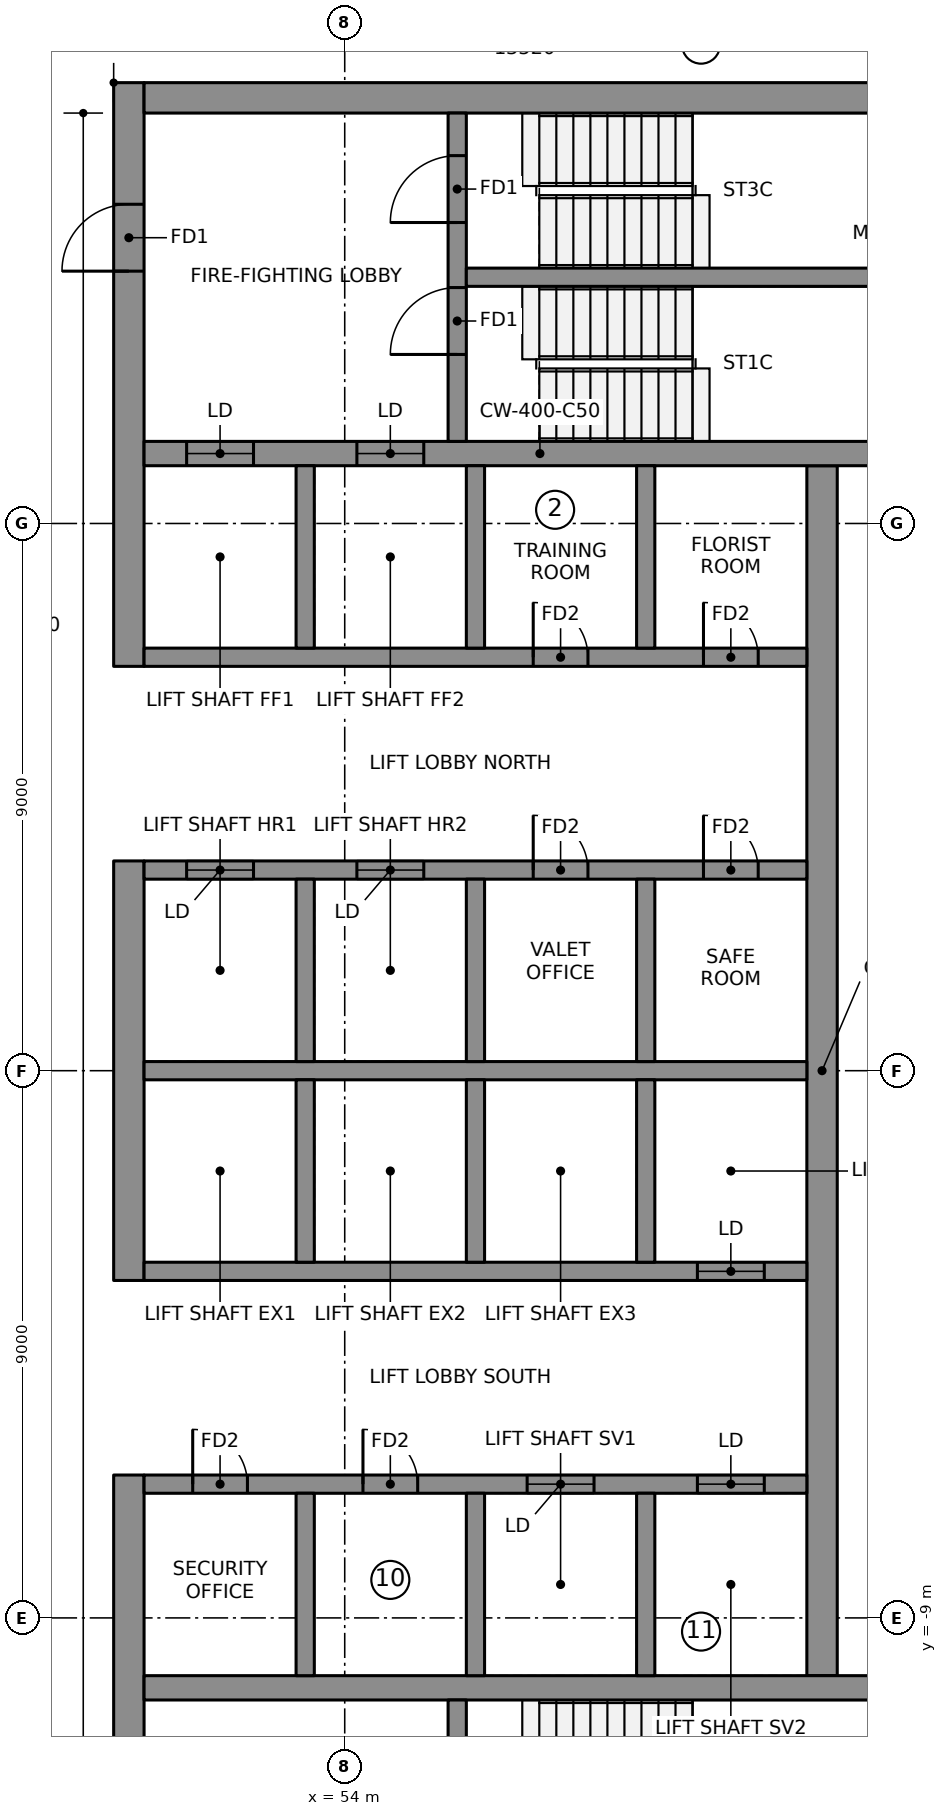
"""IFC4 building model, lengths in metres.
Left out: names, types, materials, properties, quantities, classifications, styles, units other than length and angle.
Written with IfcOpenShell. Run it as: python <this file> out.ifc"""

import sys

from ifc_helpers import new_model, si_unit, direction, frame, frame_2d, origin, place, context, subcontext, project, spatial, rectangle, extrude, element, fill, save


model = new_model("IFC4")
c1 = context("Model", 3, precision=1e-05, world=origin(), true_north=direction((0.0, 1.0)))
c2 = subcontext(c1, "Body", "Model", "MODEL_VIEW")
j1 = project(units=[si_unit("LENGTHUNIT", "METRE"), si_unit("PLANEANGLEUNIT", "RADIAN")], contexts=[c1])
p1 = place(None, origin())
s1 = spatial("IfcSite", under=j1, at=p1, CompositionType="ELEMENT")
p2 = place(p1, origin())
s2 = spatial("IfcBuilding", under=s1, at=p2, CompositionType="ELEMENT")
p3 = place(p2, frame((0.0, 0.0, 282.1)))
s3 = spatial("IfcBuildingStorey", under=s2, at=p3, CompositionType="ELEMENT", Elevation=282.1)
p4 = place(p3, frame((50.45, 6.65, 0.0), z_axis=(0.0, 0.0, 1.0), x_axis=(0.0, 1.0, 0.0)))
e1 = element("IfcWall", 1, at=p4, inside=s3, PredefinedType="SHEAR", context=c2, shape_type="SweptSolid", body=[
    extrude(rectangle(XDim=9.6, YDim=0.5, at=frame_2d((4.8, 0.0))), origin(), (0.0, 0.0, 1.0), 3.55),
])
p5 = place(p4, frame((6.5, 0.0, 0.0)))
e2 = element("IfcOpeningElement", 2, at=p5, cuts=e1, PredefinedType="OPENING", context=c2, shape_type="SweptSolid", body=[
    extrude(rectangle(XDim=1.1, YDim=2.1, at=frame_2d((0.55, 1.05))), frame((0.0, 0.26, 0.0), z_axis=(0.0, -1.0, 0.0), x_axis=(1.0, 0.0, 0.0)), (0.0, 0.0, 1.0), 0.52),
])
p6 = place(p3, frame((50.45, -3.45, 0.0), z_axis=(0.0, 0.0, 1.0), x_axis=(0.0, 1.0, 0.0)))
e3 = element("IfcWall", 3, at=p6, inside=s3, PredefinedType="SHEAR", context=c2, shape_type="SweptSolid", body=[
    extrude(rectangle(XDim=6.9, YDim=0.5, at=frame_2d((3.45, 0.0))), origin(), (0.0, 0.0, 1.0), 3.55),
])
p7 = place(p3, frame((50.45, -16.25, 0.0), z_axis=(0.0, 0.0, 1.0), x_axis=(0.0, 1.0, 0.0)))
e4 = element("IfcWall", 4, at=p7, inside=s3, PredefinedType="SHEAR", context=c2, shape_type="SweptSolid", body=[
    extrude(rectangle(XDim=9.6, YDim=0.5, at=frame_2d((4.8, 0.0))), origin(), (0.0, 0.0, 1.0), 3.55),
])
p8 = place(p7, frame((2.0, 0.0, 0.0)))
e5 = element("IfcOpeningElement", 5, at=p8, cuts=e4, PredefinedType="OPENING", context=c2, shape_type="SweptSolid", body=[
    extrude(rectangle(XDim=1.1, YDim=2.1, at=frame_2d((0.55, 1.05))), frame((0.0, 0.26, 0.0), z_axis=(0.0, -1.0, 0.0), x_axis=(1.0, 0.0, 0.0)), (0.0, 0.0, 1.0), 0.52),
])
p9 = place(p3, frame((50.7, 16.0, 0.0), z_axis=(0.0, 0.0, 1.0), x_axis=(1.0, 0.0, 0.0)))
e6 = element("IfcWall", 6, at=p9, inside=s3, PredefinedType="SHEAR", context=c2, shape_type="SweptSolid", body=[
    extrude(rectangle(XDim=13.52, YDim=0.5, at=frame_2d((6.76, 0.0))), origin(), (0.0, 0.0, 1.0), 3.55),
])
p10 = place(p3, frame((61.85, -9.95, 0.0), z_axis=(0.0, 0.0, 1.0), x_axis=(0.0, 1.0, 0.0)))
e7 = element("IfcWall", 7, at=p10, inside=s3, PredefinedType="SHEAR", context=c2, shape_type="SweptSolid", body=[
    extrude(rectangle(XDim=19.9, YDim=0.5, at=frame_2d((9.95, 0.0))), origin(), (0.0, 0.0, 1.0), 3.55),
])
p11 = place(p3, frame((50.7, 10.15, 0.0), z_axis=(0.0, 0.0, 1.0), x_axis=(1.0, 0.0, 0.0)))
e8 = element("IfcWall", 8, at=p11, inside=s3, PredefinedType="SHEAR", context=c2, shape_type="SweptSolid", body=[
    extrude(rectangle(XDim=13.02, YDim=0.4, at=frame_2d((6.51, 0.0))), origin(), (0.0, 0.0, 1.0), 3.55),
])
p12 = place(p11, frame((0.7, 0.0, 0.0)))
e9 = element("IfcOpeningElement", 9, at=p12, cuts=e8, PredefinedType="OPENING", context=c2, shape_type="SweptSolid", body=[
    extrude(rectangle(XDim=1.1, YDim=2.1, at=frame_2d((0.55, 1.05))), frame((0.0, 0.21, 0.0), z_axis=(0.0, -1.0, 0.0), x_axis=(1.0, 0.0, 0.0)), (0.0, 0.0, 1.0), 0.42),
])
p13 = place(p11, frame((3.5, 0.0, 0.0)))
e10 = element("IfcOpeningElement", 10, at=p13, cuts=e8, PredefinedType="OPENING", context=c2, shape_type="SweptSolid", body=[
    extrude(rectangle(XDim=1.1, YDim=2.1, at=frame_2d((0.55, 1.05))), frame((0.0, 0.21, 0.0), z_axis=(0.0, -1.0, 0.0), x_axis=(1.0, 0.0, 0.0)), (0.0, 0.0, 1.0), 0.42),
])
p14 = place(p3, frame((50.7, -10.15, 0.0), z_axis=(0.0, 0.0, 1.0), x_axis=(1.0, 0.0, 0.0)))
e11 = element("IfcWall", 11, at=p14, inside=s3, PredefinedType="SHEAR", context=c2, shape_type="SweptSolid", body=[
    extrude(rectangle(XDim=13.02, YDim=0.4, at=frame_2d((6.51, 0.0))), origin(), (0.0, 0.0, 1.0), 3.55),
])
p15 = place(p3, frame((50.7, 0.0, 0.0), z_axis=(0.0, 0.0, 1.0), x_axis=(1.0, 0.0, 0.0)))
e12 = element("IfcWall", 12, at=p15, inside=s3, PredefinedType="SHEAR", context=c2, shape_type="SweptSolid", body=[
    extrude(rectangle(XDim=10.9, YDim=0.3, at=frame_2d((5.45, 0.0))), origin(), (0.0, 0.0, 1.0), 3.55),
])
p16 = place(p3, frame((50.7, 3.3, 0.0), z_axis=(0.0, 0.0, 1.0), x_axis=(1.0, 0.0, 0.0)))
e13 = element("IfcWall", 13, at=p16, inside=s3, PredefinedType="SHEAR", context=c2, shape_type="SweptSolid", body=[
    extrude(rectangle(XDim=10.9, YDim=0.3, at=frame_2d((5.45, 0.0))), origin(), (0.0, 0.0, 1.0), 3.55),
])
p17 = place(p16, frame((0.7, 0.0, 0.0)))
e14 = element("IfcOpeningElement", 14, at=p17, cuts=e13, PredefinedType="OPENING", context=c2, shape_type="SweptSolid", body=[
    extrude(rectangle(XDim=1.1, YDim=2.1, at=frame_2d((0.55, 1.05))), frame((0.0, 0.16, 0.0), z_axis=(0.0, -1.0, 0.0), x_axis=(1.0, 0.0, 0.0)), (0.0, 0.0, 1.0), 0.32),
])
p18 = place(p16, frame((3.5, 0.0, 0.0)))
e15 = element("IfcOpeningElement", 15, at=p18, cuts=e13, PredefinedType="OPENING", context=c2, shape_type="SweptSolid", body=[
    extrude(rectangle(XDim=1.1, YDim=2.1, at=frame_2d((0.55, 1.05))), frame((0.0, 0.16, 0.0), z_axis=(0.0, -1.0, 0.0), x_axis=(1.0, 0.0, 0.0)), (0.0, 0.0, 1.0), 0.32),
])
p19 = place(p16, frame((6.4, 0.0, 0.0)))
e16 = element("IfcOpeningElement", 16, at=p19, cuts=e13, PredefinedType="OPENING", context=c2, shape_type="SweptSolid", body=[
    extrude(rectangle(XDim=0.9, YDim=2.1, at=frame_2d((0.45, 1.05))), frame((0.0, 0.16, 0.0), z_axis=(0.0, -1.0, 0.0), x_axis=(1.0, 0.0, 0.0)), (0.0, 0.0, 1.0), 0.32),
])
p20 = place(p16, frame((9.2, 0.0, 0.0)))
e17 = element("IfcOpeningElement", 17, at=p20, cuts=e13, PredefinedType="OPENING", context=c2, shape_type="SweptSolid", body=[
    extrude(rectangle(XDim=0.9, YDim=2.1, at=frame_2d((0.45, 1.05))), frame((0.0, 0.16, 0.0), z_axis=(0.0, -1.0, 0.0), x_axis=(1.0, 0.0, 0.0)), (0.0, 0.0, 1.0), 0.32),
])
p21 = place(p3, frame((50.7, 6.8, 0.0), z_axis=(0.0, 0.0, 1.0), x_axis=(1.0, 0.0, 0.0)))
e18 = element("IfcWall", 18, at=p21, inside=s3, PredefinedType="SHEAR", context=c2, shape_type="SweptSolid", body=[
    extrude(rectangle(XDim=10.9, YDim=0.3, at=frame_2d((5.45, 0.0))), origin(), (0.0, 0.0, 1.0), 3.55),
])
p22 = place(p21, frame((6.4, 0.0, 0.0)))
e19 = element("IfcOpeningElement", 19, at=p22, cuts=e18, PredefinedType="OPENING", context=c2, shape_type="SweptSolid", body=[
    extrude(rectangle(XDim=0.9, YDim=2.1, at=frame_2d((0.45, 1.05))), frame((0.0, 0.16, 0.0), z_axis=(0.0, -1.0, 0.0), x_axis=(1.0, 0.0, 0.0)), (0.0, 0.0, 1.0), 0.32),
])
p23 = place(p21, frame((9.2, 0.0, 0.0)))
e20 = element("IfcOpeningElement", 20, at=p23, cuts=e18, PredefinedType="OPENING", context=c2, shape_type="SweptSolid", body=[
    extrude(rectangle(XDim=0.9, YDim=2.1, at=frame_2d((0.45, 1.05))), frame((0.0, 0.16, 0.0), z_axis=(0.0, -1.0, 0.0), x_axis=(1.0, 0.0, 0.0)), (0.0, 0.0, 1.0), 0.32),
])
for number, where, z_axis, x_axis in (
    (21, (53.35, 0.15, 0.0), (0.0, 0.0, 1.0), (0.0, 1.0, 0.0)),
    (22, (53.35, 6.95, 0.0), (0.0, 0.0, 1.0), (0.0, 1.0, 0.0)),
    (23, (56.15, 0.15, 0.0), (0.0, 0.0, 1.0), (0.0, 1.0, 0.0)),
    (24, (56.15, 6.95, 0.0), (0.0, 0.0, 1.0), (0.0, 1.0, 0.0)),
    (25, (58.95, 0.15, 0.0), (0.0, 0.0, 1.0), (0.0, 1.0, 0.0)),
    (26, (58.95, 6.95, 0.0), (0.0, 0.0, 1.0), (0.0, 1.0, 0.0)),
):
    element("IfcWall", number, at=place(p3, frame(where, z_axis=z_axis, x_axis=x_axis)), inside=s3, PredefinedType="SHEAR", context=c2, shape_type="SweptSolid", body=[
        extrude(rectangle(XDim=3.0, YDim=0.3, at=frame_2d((1.5, 0.0))), origin(), (0.0, 0.0, 1.0), 3.55),
    ])
p24 = place(p3, frame((50.7, -3.3, 0.0), z_axis=(0.0, 0.0, 1.0), x_axis=(1.0, 0.0, 0.0)))
e27 = element("IfcWall", 27, at=p24, inside=s3, PredefinedType="SHEAR", context=c2, shape_type="SweptSolid", body=[
    extrude(rectangle(XDim=10.9, YDim=0.3, at=frame_2d((5.45, 0.0))), origin(), (0.0, 0.0, 1.0), 3.55),
])
p25 = place(p24, frame((9.1, 0.0, 0.0)))
e28 = element("IfcOpeningElement", 28, at=p25, cuts=e27, PredefinedType="OPENING", context=c2, shape_type="SweptSolid", body=[
    extrude(rectangle(XDim=1.1, YDim=2.1, at=frame_2d((0.55, 1.05))), frame((0.0, 0.16, 0.0), z_axis=(0.0, -1.0, 0.0), x_axis=(1.0, 0.0, 0.0)), (0.0, 0.0, 1.0), 0.32),
])
p26 = place(p3, frame((50.7, -6.8, 0.0), z_axis=(0.0, 0.0, 1.0), x_axis=(1.0, 0.0, 0.0)))
e29 = element("IfcWall", 29, at=p26, inside=s3, PredefinedType="SHEAR", context=c2, shape_type="SweptSolid", body=[
    extrude(rectangle(XDim=10.9, YDim=0.3, at=frame_2d((5.45, 0.0))), origin(), (0.0, 0.0, 1.0), 3.55),
])
p27 = place(p26, frame((6.3, 0.0, 0.0)))
e30 = element("IfcOpeningElement", 30, at=p27, cuts=e29, PredefinedType="OPENING", context=c2, shape_type="SweptSolid", body=[
    extrude(rectangle(XDim=1.1, YDim=2.1, at=frame_2d((0.55, 1.05))), frame((0.0, 0.16, 0.0), z_axis=(0.0, -1.0, 0.0), x_axis=(1.0, 0.0, 0.0)), (0.0, 0.0, 1.0), 0.32),
])
p28 = place(p26, frame((9.1, 0.0, 0.0)))
e31 = element("IfcOpeningElement", 31, at=p28, cuts=e29, PredefinedType="OPENING", context=c2, shape_type="SweptSolid", body=[
    extrude(rectangle(XDim=1.1, YDim=2.1, at=frame_2d((0.55, 1.05))), frame((0.0, 0.16, 0.0), z_axis=(0.0, -1.0, 0.0), x_axis=(1.0, 0.0, 0.0)), (0.0, 0.0, 1.0), 0.32),
])
p29 = place(p26, frame((0.8, 0.0, 0.0)))
e32 = element("IfcOpeningElement", 32, at=p29, cuts=e29, PredefinedType="OPENING", context=c2, shape_type="SweptSolid", body=[
    extrude(rectangle(XDim=0.9, YDim=2.1, at=frame_2d((0.45, 1.05))), frame((0.0, 0.16, 0.0), z_axis=(0.0, -1.0, 0.0), x_axis=(1.0, 0.0, 0.0)), (0.0, 0.0, 1.0), 0.32),
])
p30 = place(p26, frame((3.6, 0.0, 0.0)))
e33 = element("IfcOpeningElement", 33, at=p30, cuts=e29, PredefinedType="OPENING", context=c2, shape_type="SweptSolid", body=[
    extrude(rectangle(XDim=0.9, YDim=2.1, at=frame_2d((0.45, 1.05))), frame((0.0, 0.16, 0.0), z_axis=(0.0, -1.0, 0.0), x_axis=(1.0, 0.0, 0.0)), (0.0, 0.0, 1.0), 0.32),
])
for number, where, z_axis, x_axis in (
    (34, (53.35, -3.15, 0.0), (0.0, 0.0, 1.0), (0.0, 1.0, 0.0)),
    (35, (53.35, -9.95, 0.0), (0.0, 0.0, 1.0), (0.0, 1.0, 0.0)),
    (36, (56.15, -3.15, 0.0), (0.0, 0.0, 1.0), (0.0, 1.0, 0.0)),
    (37, (56.15, -9.95, 0.0), (0.0, 0.0, 1.0), (0.0, 1.0, 0.0)),
    (38, (58.95, -3.15, 0.0), (0.0, 0.0, 1.0), (0.0, 1.0, 0.0)),
    (39, (58.95, -9.95, 0.0), (0.0, 0.0, 1.0), (0.0, 1.0, 0.0)),
):
    element("IfcWall", number, at=place(p3, frame(where, z_axis=z_axis, x_axis=x_axis)), inside=s3, PredefinedType="SHEAR", context=c2, shape_type="SweptSolid", body=[
        extrude(rectangle(XDim=3.0, YDim=0.3, at=frame_2d((1.5, 0.0))), origin(), (0.0, 0.0, 1.0), 3.55),
    ])
p31 = place(p3, frame((55.85, 10.35, 0.0), z_axis=(0.0, 0.0, 1.0), x_axis=(0.0, 1.0, 0.0)))
e40 = element("IfcWall", 40, at=p31, inside=s3, PredefinedType="SHEAR", context=c2, shape_type="SweptSolid", body=[
    extrude(rectangle(XDim=5.4, YDim=0.3, at=frame_2d((2.7, 0.0))), origin(), (0.0, 0.0, 1.0), 3.55),
])
p32 = place(p31, frame((1.43, 0.0, 0.0)))
e41 = element("IfcOpeningElement", 41, at=p32, cuts=e40, PredefinedType="OPENING", context=c2, shape_type="SweptSolid", body=[
    extrude(rectangle(XDim=1.1, YDim=2.1, at=frame_2d((0.55, 1.05))), frame((0.0, 0.16, 0.0), z_axis=(0.0, -1.0, 0.0), x_axis=(1.0, 0.0, 0.0)), (0.0, 0.0, 1.0), 0.32),
])
p33 = place(p31, frame((3.6, 0.0, 0.0)))
e42 = element("IfcOpeningElement", 42, at=p33, cuts=e40, PredefinedType="OPENING", context=c2, shape_type="SweptSolid", body=[
    extrude(rectangle(XDim=1.1, YDim=2.1, at=frame_2d((0.55, 1.05))), frame((0.0, 0.16, 0.0), z_axis=(0.0, -1.0, 0.0), x_axis=(1.0, 0.0, 0.0)), (0.0, 0.0, 1.0), 0.32),
])
p34 = place(p3, frame((55.85, -15.75, 0.0), z_axis=(0.0, 0.0, 1.0), x_axis=(0.0, 1.0, 0.0)))
e43 = element("IfcWall", 43, at=p34, inside=s3, PredefinedType="SHEAR", context=c2, shape_type="SweptSolid", body=[
    extrude(rectangle(XDim=5.4, YDim=0.3, at=frame_2d((2.7, 0.0))), origin(), (0.0, 0.0, 1.0), 3.55),
])
p35 = place(p34, frame((3.6, 0.0, 0.0)))
e44 = element("IfcOpeningElement", 44, at=p35, cuts=e43, PredefinedType="OPENING", context=c2, shape_type="SweptSolid", body=[
    extrude(rectangle(XDim=1.1, YDim=2.1, at=frame_2d((0.55, 1.05))), frame((0.0, 0.16, 0.0), z_axis=(0.0, -1.0, 0.0), x_axis=(1.0, 0.0, 0.0)), (0.0, 0.0, 1.0), 0.32),
])
p36 = place(p34, frame((0.8, 0.0, 0.0)))
e45 = element("IfcOpeningElement", 45, at=p36, cuts=e43, PredefinedType="OPENING", context=c2, shape_type="SweptSolid", body=[
    extrude(rectangle(XDim=0.9, YDim=2.1, at=frame_2d((0.45, 1.05))), frame((0.0, 0.16, 0.0), z_axis=(0.0, -1.0, 0.0), x_axis=(1.0, 0.0, 0.0)), (0.0, 0.0, 1.0), 0.32),
])
p37 = place(p3, frame((56.0, 13.05, 0.0), z_axis=(0.0, 0.0, 1.0), x_axis=(1.0, 0.0, 0.0)))
e46 = element("IfcWall", 46, at=p37, inside=s3, PredefinedType="SHEAR", context=c2, shape_type="SweptSolid", body=[
    extrude(rectangle(XDim=7.72, YDim=0.3, at=frame_2d((3.86, 0.0))), origin(), (0.0, 0.0, 1.0), 3.55),
])
p38 = place(p12, origin())
e47 = element("IfcDoor", 47, at=p38, inside=s3, OperationType="DOUBLE_DOOR_SLIDING", PredefinedType="DOOR", context=c2, shape_type="SweptSolid", body=[
    extrude(rectangle(XDim=1.1, YDim=2.1, at=frame_2d((0.55, 1.05))), frame((0.0, 0.025, 0.0), z_axis=(0.0, -1.0, 0.0), x_axis=(1.0, 0.0, 0.0)), (0.0, 0.0, 1.0), 0.05),
])
fill(e9, e47)
p39 = place(p13, origin())
e48 = element("IfcDoor", 48, at=p39, inside=s3, OperationType="DOUBLE_DOOR_SLIDING", PredefinedType="DOOR", context=c2, shape_type="SweptSolid", body=[
    extrude(rectangle(XDim=1.1, YDim=2.1, at=frame_2d((0.55, 1.05))), frame((0.0, 0.025, 0.0), z_axis=(0.0, -1.0, 0.0), x_axis=(1.0, 0.0, 0.0)), (0.0, 0.0, 1.0), 0.05),
])
fill(e10, e48)
p40 = place(p17, origin())
e49 = element("IfcDoor", 49, at=p40, inside=s3, OperationType="DOUBLE_DOOR_SLIDING", PredefinedType="DOOR", context=c2, shape_type="SweptSolid", body=[
    extrude(rectangle(XDim=1.1, YDim=2.1, at=frame_2d((0.55, 1.05))), frame((0.0, 0.025, 0.0), z_axis=(0.0, -1.0, 0.0), x_axis=(1.0, 0.0, 0.0)), (0.0, 0.0, 1.0), 0.05),
])
fill(e14, e49)
p41 = place(p18, origin())
e50 = element("IfcDoor", 50, at=p41, inside=s3, OperationType="DOUBLE_DOOR_SLIDING", PredefinedType="DOOR", context=c2, shape_type="SweptSolid", body=[
    extrude(rectangle(XDim=1.1, YDim=2.1, at=frame_2d((0.55, 1.05))), frame((0.0, 0.025, 0.0), z_axis=(0.0, -1.0, 0.0), x_axis=(1.0, 0.0, 0.0)), (0.0, 0.0, 1.0), 0.05),
])
fill(e15, e50)
p42 = place(p25, origin())
e51 = element("IfcDoor", 51, at=p42, inside=s3, OperationType="DOUBLE_DOOR_SLIDING", PredefinedType="DOOR", context=c2, shape_type="SweptSolid", body=[
    extrude(rectangle(XDim=1.1, YDim=2.1, at=frame_2d((0.55, 1.05))), frame((0.0, 0.025, 0.0), z_axis=(0.0, -1.0, 0.0), x_axis=(1.0, 0.0, 0.0)), (0.0, 0.0, 1.0), 0.05),
])
fill(e28, e51)
p43 = place(p27, origin())
e52 = element("IfcDoor", 52, at=p43, inside=s3, OperationType="DOUBLE_DOOR_SLIDING", PredefinedType="DOOR", context=c2, shape_type="SweptSolid", body=[
    extrude(rectangle(XDim=1.1, YDim=2.1, at=frame_2d((0.55, 1.05))), frame((0.0, 0.025, 0.0), z_axis=(0.0, -1.0, 0.0), x_axis=(1.0, 0.0, 0.0)), (0.0, 0.0, 1.0), 0.05),
])
fill(e30, e52)
p44 = place(p28, origin())
e53 = element("IfcDoor", 53, at=p44, inside=s3, OperationType="DOUBLE_DOOR_SLIDING", PredefinedType="DOOR", context=c2, shape_type="SweptSolid", body=[
    extrude(rectangle(XDim=1.1, YDim=2.1, at=frame_2d((0.55, 1.05))), frame((0.0, 0.025, 0.0), z_axis=(0.0, -1.0, 0.0), x_axis=(1.0, 0.0, 0.0)), (0.0, 0.0, 1.0), 0.05),
])
fill(e31, e53)
p45 = place(p32, origin())
e54 = element("IfcDoor", 54, at=p45, inside=s3, OperationType="SINGLE_SWING_RIGHT", PredefinedType="DOOR", context=c2, shape_type="SweptSolid", body=[
    extrude(rectangle(XDim=1.1, YDim=2.1, at=frame_2d((0.55, 1.05))), frame((0.0, 0.025, 0.0), z_axis=(0.0, -1.0, 0.0), x_axis=(1.0, 0.0, 0.0)), (0.0, 0.0, 1.0), 0.05),
])
fill(e41, e54)
p46 = place(p33, origin())
e55 = element("IfcDoor", 55, at=p46, inside=s3, OperationType="SINGLE_SWING_RIGHT", PredefinedType="DOOR", context=c2, shape_type="SweptSolid", body=[
    extrude(rectangle(XDim=1.1, YDim=2.1, at=frame_2d((0.55, 1.05))), frame((0.0, 0.025, 0.0), z_axis=(0.0, -1.0, 0.0), x_axis=(1.0, 0.0, 0.0)), (0.0, 0.0, 1.0), 0.05),
])
fill(e42, e55)
p47 = place(p5, origin())
e56 = element("IfcDoor", 56, at=p47, inside=s3, OperationType="SINGLE_SWING_RIGHT", PredefinedType="DOOR", context=c2, shape_type="SweptSolid", body=[
    extrude(rectangle(XDim=1.1, YDim=2.1, at=frame_2d((0.55, 1.05))), frame((0.0, 0.025, 0.0), z_axis=(0.0, -1.0, 0.0), x_axis=(1.0, 0.0, 0.0)), (0.0, 0.0, 1.0), 0.05),
])
fill(e2, e56)
p48 = place(p22, origin())
e57 = element("IfcDoor", 57, at=p48, inside=s3, OperationType="SINGLE_SWING_LEFT", PredefinedType="DOOR", context=c2, shape_type="SweptSolid", body=[
    extrude(rectangle(XDim=0.9, YDim=2.1, at=frame_2d((0.45, 1.05))), frame((0.0, 0.025, 0.0), z_axis=(0.0, -1.0, 0.0), x_axis=(1.0, 0.0, 0.0)), (0.0, 0.0, 1.0), 0.05),
])
fill(e19, e57)
p49 = place(p23, origin())
e58 = element("IfcDoor", 58, at=p49, inside=s3, OperationType="SINGLE_SWING_LEFT", PredefinedType="DOOR", context=c2, shape_type="SweptSolid", body=[
    extrude(rectangle(XDim=0.9, YDim=2.1, at=frame_2d((0.45, 1.05))), frame((0.0, 0.025, 0.0), z_axis=(0.0, -1.0, 0.0), x_axis=(1.0, 0.0, 0.0)), (0.0, 0.0, 1.0), 0.05),
])
fill(e20, e58)
p50 = place(p19, origin())
e59 = element("IfcDoor", 59, at=p50, inside=s3, OperationType="SINGLE_SWING_LEFT", PredefinedType="DOOR", context=c2, shape_type="SweptSolid", body=[
    extrude(rectangle(XDim=0.9, YDim=2.1, at=frame_2d((0.45, 1.05))), frame((0.0, 0.025, 0.0), z_axis=(0.0, -1.0, 0.0), x_axis=(1.0, 0.0, 0.0)), (0.0, 0.0, 1.0), 0.05),
])
fill(e16, e59)
p51 = place(p20, origin())
e60 = element("IfcDoor", 60, at=p51, inside=s3, OperationType="SINGLE_SWING_LEFT", PredefinedType="DOOR", context=c2, shape_type="SweptSolid", body=[
    extrude(rectangle(XDim=0.9, YDim=2.1, at=frame_2d((0.45, 1.05))), frame((0.0, 0.025, 0.0), z_axis=(0.0, -1.0, 0.0), x_axis=(1.0, 0.0, 0.0)), (0.0, 0.0, 1.0), 0.05),
])
fill(e17, e60)
p52 = place(p29, origin())
e61 = element("IfcDoor", 61, at=p52, inside=s3, OperationType="SINGLE_SWING_LEFT", PredefinedType="DOOR", context=c2, shape_type="SweptSolid", body=[
    extrude(rectangle(XDim=0.9, YDim=2.1, at=frame_2d((0.45, 1.05))), frame((0.0, 0.025, 0.0), z_axis=(0.0, -1.0, 0.0), x_axis=(1.0, 0.0, 0.0)), (0.0, 0.0, 1.0), 0.05),
])
fill(e32, e61)
p53 = place(p30, origin())
e62 = element("IfcDoor", 62, at=p53, inside=s3, OperationType="SINGLE_SWING_LEFT", PredefinedType="DOOR", context=c2, shape_type="SweptSolid", body=[
    extrude(rectangle(XDim=0.9, YDim=2.1, at=frame_2d((0.45, 1.05))), frame((0.0, 0.025, 0.0), z_axis=(0.0, -1.0, 0.0), x_axis=(1.0, 0.0, 0.0)), (0.0, 0.0, 1.0), 0.05),
])
fill(e33, e62)
save(model, sys.argv[1])
